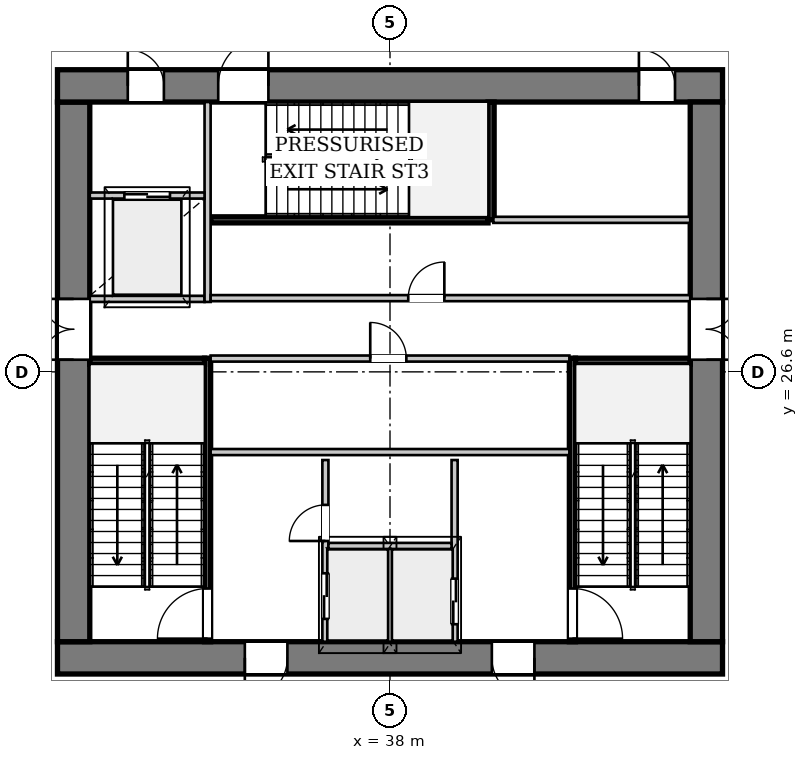
"""IFC4 building model, lengths in metres.
Left out: names, types, materials, properties, quantities, classifications, styles, units other than length and angle.
Written with IfcOpenShell. Run it as: python <this file> out.ifc"""

import sys

from ifc_helpers import new_model, si_unit, direction, frame, frame_2d, origin, place, context, subcontext, project, spatial, rectangle, extrude, source, transform, mapped, element, fill, save


model = new_model("IFC4")
c1 = context("Model", 3, precision=1e-05, world=origin(), true_north=direction((0.0, 1.0)))
c2 = subcontext(c1, "Body", "Model", "MODEL_VIEW")
j1 = project(units=[si_unit("LENGTHUNIT", "METRE"), si_unit("PLANEANGLEUNIT", "RADIAN")], contexts=[c1])
p1 = place(None, origin())
s1 = spatial("IfcSite", under=j1, at=p1, CompositionType="ELEMENT")
p2 = place(p1, origin())
s2 = spatial("IfcBuilding", under=s1, at=p2, CompositionType="ELEMENT")
p3 = place(p2, frame((0.0, 0.0, -4.8)))
s3 = spatial("IfcBuildingStorey", under=s2, at=p3, CompositionType="ELEMENT", Elevation=-4.8)
p4 = place(p3, frame((46.75, 19.075, 0.0), z_axis=(0.0, 0.0, 1.0), x_axis=(-1.0, 0.0, 0.0)))
e1 = element("IfcWall", 1, at=p4, inside=s3, PredefinedType="SHEAR", context=c2, shape_type="SweptSolid", body=[
    extrude(rectangle(XDim=17.5, YDim=0.85, at=frame_2d((8.75, 0.0))), origin(), (0.0, 0.0, 1.0), 4.48),
])
p5 = place(p4, frame((4.95, 0.0, 0.0)))
e2 = element("IfcOpeningElement", 2, at=p5, cuts=e1, PredefinedType="OPENING", context=c2, shape_type="SweptSolid", body=[
    extrude(rectangle(XDim=1.12, YDim=2.25, at=frame_2d((0.56, 1.125))), frame((0.0, 0.435, 0.0), z_axis=(0.0, -1.0, 0.0), x_axis=(1.0, 0.0, 0.0)), (0.0, 0.0, 1.0), 0.87),
])
p6 = place(p4, frame((11.45, 0.0, 0.0)))
e3 = element("IfcOpeningElement", 3, at=p6, cuts=e1, PredefinedType="OPENING", context=c2, shape_type="SweptSolid", body=[
    extrude(rectangle(XDim=1.12, YDim=2.25, at=frame_2d((0.56, 1.125))), frame((0.0, 0.435, 0.0), z_axis=(0.0, -1.0, 0.0), x_axis=(1.0, 0.0, 0.0)), (0.0, 0.0, 1.0), 0.87),
])
p7 = place(p3, frame((29.675, 19.5, 0.0), z_axis=(0.0, 0.0, 1.0), x_axis=(0.0, 1.0, 0.0)))
e4 = element("IfcWall", 4, at=p7, inside=s3, PredefinedType="SHEAR", context=c2, shape_type="SweptSolid", body=[
    extrude(rectangle(XDim=14.2, YDim=0.85, at=frame_2d((7.1, 0.0))), origin(), (0.0, 0.0, 1.0), 4.48),
])
p8 = place(p7, frame((7.42, 0.0, 0.0)))
e5 = element("IfcOpeningElement", 5, at=p8, cuts=e4, PredefinedType="OPENING", context=c2, shape_type="SweptSolid", body=[
    extrude(rectangle(XDim=1.6, YDim=2.2, at=frame_2d((0.8, 1.1))), frame((0.0, 0.435, 0.0), z_axis=(0.0, -1.0, 0.0), x_axis=(1.0, 0.0, 0.0)), (0.0, 0.0, 1.0), 0.87),
])
p9 = place(p3, frame((29.25, 34.125, 0.0), z_axis=(0.0, 0.0, 1.0), x_axis=(1.0, 0.0, 0.0)))
e6 = element("IfcWall", 6, at=p9, inside=s3, PredefinedType="SHEAR", context=c2, shape_type="SweptSolid", body=[
    extrude(rectangle(XDim=17.5, YDim=0.85, at=frame_2d((8.75, 0.0))), origin(), (0.0, 0.0, 1.0), 4.48),
])
p10 = place(p9, frame((1.85, 0.0, 0.0)))
e7 = element("IfcOpeningElement", 7, at=p10, cuts=e6, PredefinedType="OPENING", context=c2, shape_type="SweptSolid", body=[
    extrude(rectangle(XDim=0.95, YDim=2.1, at=frame_2d((0.475, 1.05))), frame((0.0, 0.435, 0.0), z_axis=(0.0, -1.0, 0.0), x_axis=(1.0, 0.0, 0.0)), (0.0, 0.0, 1.0), 0.87),
])
p11 = place(p9, frame((4.23, 0.0, 0.0)))
e8 = element("IfcOpeningElement", 8, at=p11, cuts=e6, PredefinedType="OPENING", context=c2, shape_type="SweptSolid", body=[
    extrude(rectangle(XDim=1.32, YDim=2.2, at=frame_2d((0.66, 1.1))), frame((0.0, 0.435, 0.0), z_axis=(0.0, -1.0, 0.0), x_axis=(1.0, 0.0, 0.0)), (0.0, 0.0, 1.0), 0.87),
])
p12 = place(p9, frame((15.3, 0.0, 0.0)))
e9 = element("IfcOpeningElement", 9, at=p12, cuts=e6, PredefinedType="OPENING", context=c2, shape_type="SweptSolid", body=[
    extrude(rectangle(XDim=0.95, YDim=2.1, at=frame_2d((0.475, 1.05))), frame((0.0, 0.435, 0.0), z_axis=(0.0, -1.0, 0.0), x_axis=(1.0, 0.0, 0.0)), (0.0, 0.0, 1.0), 0.87),
])
p13 = place(p3, frame((46.325, 33.7, 0.0), z_axis=(0.0, 0.0, 1.0), x_axis=(0.0, -1.0, 0.0)))
e10 = element("IfcWall", 10, at=p13, inside=s3, PredefinedType="SHEAR", context=c2, shape_type="SweptSolid", body=[
    extrude(rectangle(XDim=14.2, YDim=0.85, at=frame_2d((7.1, 0.0))), origin(), (0.0, 0.0, 1.0), 4.48),
])
p14 = place(p13, frame((5.18, 0.0, 0.0)))
e11 = element("IfcOpeningElement", 11, at=p14, cuts=e10, PredefinedType="OPENING", context=c2, shape_type="SweptSolid", body=[
    extrude(rectangle(XDim=1.6, YDim=2.2, at=frame_2d((0.8, 1.1))), frame((0.0, 0.435, 0.0), z_axis=(0.0, -1.0, 0.0), x_axis=(1.0, 0.0, 0.0)), (0.0, 0.0, 1.0), 0.87),
])
p15 = place(p3, frame((33.2, 19.5, 0.0), z_axis=(0.0, 0.0, 1.0), x_axis=(0.0, 1.0, 0.0)))
e12 = element("IfcWall", 12, at=p15, inside=s3, PredefinedType="PARTITIONING", context=c2, shape_type="SweptSolid", body=[
    extrude(rectangle(XDim=7.46, YDim=0.16, at=frame_2d((3.73, 0.0))), origin(), (0.0, 0.0, 1.0), 4.48),
])
p16 = place(p15, frame((0.08, 0.0, 0.0)))
e13 = element("IfcOpeningElement", 13, at=p16, cuts=e12, PredefinedType="OPENING", context=c2, shape_type="SweptSolid", body=[
    extrude(rectangle(XDim=1.32, YDim=2.2, at=frame_2d((0.66, 1.1))), frame((0.0, 0.09, 0.0), z_axis=(0.0, -1.0, 0.0), x_axis=(1.0, 0.0, 0.0)), (0.0, 0.0, 1.0), 0.18),
])
p17 = place(p3, frame((30.1, 26.88, 0.0), z_axis=(0.0, 0.0, 1.0), x_axis=(1.0, 0.0, 0.0)))
e14 = element("IfcWall", 14, at=p17, inside=s3, PredefinedType="PARTITIONING", context=c2, shape_type="SweptSolid", body=[
    extrude(rectangle(XDim=3.02, YDim=0.16, at=frame_2d((1.51, 0.0))), origin(), (0.0, 0.0, 1.0), 4.48),
])
p18 = place(p3, frame((42.8, 26.96, 0.0), z_axis=(0.0, 0.0, 1.0), x_axis=(0.0, -1.0, 0.0)))
e15 = element("IfcWall", 15, at=p18, inside=s3, PredefinedType="PARTITIONING", context=c2, shape_type="SweptSolid", body=[
    extrude(rectangle(XDim=7.46, YDim=0.16, at=frame_2d((3.73, 0.0))), origin(), (0.0, 0.0, 1.0), 4.48),
])
p19 = place(p18, frame((6.06, 0.0, 0.0)))
e16 = element("IfcOpeningElement", 16, at=p19, cuts=e15, PredefinedType="OPENING", context=c2, shape_type="SweptSolid", body=[
    extrude(rectangle(XDim=1.32, YDim=2.2, at=frame_2d((0.66, 1.1))), frame((0.0, 0.09, 0.0), z_axis=(0.0, -1.0, 0.0), x_axis=(1.0, 0.0, 0.0)), (0.0, 0.0, 1.0), 0.18),
])
p20 = place(p3, frame((42.88, 26.88, 0.0), z_axis=(0.0, 0.0, 1.0), x_axis=(1.0, 0.0, 0.0)))
e17 = element("IfcWall", 17, at=p20, inside=s3, PredefinedType="PARTITIONING", context=c2, shape_type="SweptSolid", body=[
    extrude(rectangle(XDim=3.02, YDim=0.16, at=frame_2d((1.51, 0.0))), origin(), (0.0, 0.0, 1.0), 4.48),
])
p21 = place(p3, frame((33.28, 30.6, 0.0), z_axis=(0.0, 0.0, 1.0), x_axis=(1.0, 0.0, 0.0)))
e18 = element("IfcWall", 18, at=p21, inside=s3, PredefinedType="PARTITIONING", context=c2, shape_type="SweptSolid", body=[
    extrude(rectangle(XDim=7.3, YDim=0.16, at=frame_2d((3.65, 0.0))), origin(), (0.0, 0.0, 1.0), 4.48),
])
p22 = place(p3, frame((40.66, 30.6, 0.0), z_axis=(0.0, 0.0, 1.0), x_axis=(0.0, 1.0, 0.0)))
e19 = element("IfcWall", 19, at=p22, inside=s3, PredefinedType="PARTITIONING", context=c2, shape_type="SweptSolid", body=[
    extrude(rectangle(XDim=3.1, YDim=0.16, at=frame_2d((1.55, 0.0))), origin(), (0.0, 0.0, 1.0), 4.48),
])
p23 = place(p3, frame((36.3, 19.5, 0.0), z_axis=(0.0, 0.0, 1.0), x_axis=(0.0, 1.0, 0.0)))
e20 = element("IfcWall", 20, at=p23, inside=s3, PredefinedType="PARTITIONING", context=c2, shape_type="SweptSolid", body=[
    extrude(rectangle(XDim=4.78, YDim=0.16, at=frame_2d((2.39, 0.0))), origin(), (0.0, 0.0, 1.0), 4.48),
])
p24 = place(p23, frame((0.6, 0.0, 0.0)))
e21 = element("IfcOpeningElement", 21, at=p24, cuts=e20, PredefinedType="OPENING", context=c2, shape_type="SweptSolid", body=[
    extrude(rectangle(XDim=1.2, YDim=2.2, at=frame_2d((0.6, 1.1))), frame((0.0, 0.09, 0.0), z_axis=(0.0, -1.0, 0.0), x_axis=(1.0, 0.0, 0.0)), (0.0, 0.0, 1.0), 0.18),
])
p25 = place(p23, frame((2.65, 0.0, 0.0)))
e22 = element("IfcOpeningElement", 22, at=p25, cuts=e20, PredefinedType="OPENING", context=c2, shape_type="SweptSolid", body=[
    extrude(rectangle(XDim=0.95, YDim=2.1, at=frame_2d((0.475, 1.05))), frame((0.0, 0.09, 0.0), z_axis=(0.0, -1.0, 0.0), x_axis=(1.0, 0.0, 0.0)), (0.0, 0.0, 1.0), 0.18),
])
p26 = place(p3, frame((39.7, 24.28, 0.0), z_axis=(0.0, 0.0, 1.0), x_axis=(0.0, -1.0, 0.0)))
e23 = element("IfcWall", 23, at=p26, inside=s3, PredefinedType="PARTITIONING", context=c2, shape_type="SweptSolid", body=[
    extrude(rectangle(XDim=4.78, YDim=0.16, at=frame_2d((2.39, 0.0))), origin(), (0.0, 0.0, 1.0), 4.48),
])
p27 = place(p26, frame((3.12, 0.0, 0.0)))
e24 = element("IfcOpeningElement", 24, at=p27, cuts=e23, PredefinedType="OPENING", context=c2, shape_type="SweptSolid", body=[
    extrude(rectangle(XDim=1.2, YDim=2.2, at=frame_2d((0.6, 1.1))), frame((0.0, 0.09, 0.0), z_axis=(0.0, -1.0, 0.0), x_axis=(1.0, 0.0, 0.0)), (0.0, 0.0, 1.0), 0.18),
])
p28 = place(p3, frame((38.0, 19.5, 0.0), z_axis=(0.0, 0.0, 1.0), x_axis=(0.0, 1.0, 0.0)))
e25 = element("IfcWall", 25, at=p28, inside=s3, PredefinedType="PARTITIONING", context=c2, shape_type="SweptSolid", body=[
    extrude(rectangle(XDim=2.46, YDim=0.125, at=frame_2d((1.23, 0.0))), origin(), (0.0, 0.0, 1.0), 4.48),
])
p29 = place(p3, frame((36.38, 22.02, 0.0), z_axis=(0.0, 0.0, 1.0), x_axis=(1.0, 0.0, 0.0)))
e26 = element("IfcWall", 26, at=p29, inside=s3, PredefinedType="PARTITIONING", context=c2, shape_type="SweptSolid", body=[
    extrude(rectangle(XDim=3.24, YDim=0.16, at=frame_2d((1.62, 0.0))), origin(), (0.0, 0.0, 1.0), 4.48),
])
p30 = place(p3, frame((33.28, 24.49, 0.0), z_axis=(0.0, 0.0, 1.0), x_axis=(1.0, 0.0, 0.0)))
e27 = element("IfcWall", 27, at=p30, inside=s3, PredefinedType="PARTITIONING", context=c2, shape_type="SweptSolid", body=[
    extrude(rectangle(XDim=9.44, YDim=0.16, at=frame_2d((4.72, 0.0))), origin(), (0.0, 0.0, 1.0), 4.48),
])
p31 = place(p3, frame((30.1, 28.52, 0.0), z_axis=(0.0, 0.0, 1.0), x_axis=(1.0, 0.0, 0.0)))
e28 = element("IfcWall", 28, at=p31, inside=s3, PredefinedType="PARTITIONING", context=c2, shape_type="SweptSolid", body=[
    extrude(rectangle(XDim=3.02, YDim=0.16, at=frame_2d((1.51, 0.0))), origin(), (0.0, 0.0, 1.0), 4.48),
])
p32 = place(p3, frame((33.2, 28.44, 0.0), z_axis=(0.0, 0.0, 1.0), x_axis=(0.0, 1.0, 0.0)))
e29 = element("IfcWall", 29, at=p32, inside=s3, PredefinedType="PARTITIONING", context=c2, shape_type="SweptSolid", body=[
    extrude(rectangle(XDim=5.26, YDim=0.16, at=frame_2d((2.63, 0.0))), origin(), (0.0, 0.0, 1.0), 4.48),
])
p33 = place(p3, frame((30.1, 31.24, 0.0), z_axis=(0.0, 0.0, 1.0), x_axis=(1.0, 0.0, 0.0)))
e30 = element("IfcWall", 30, at=p33, inside=s3, PredefinedType="PARTITIONING", context=c2, shape_type="SweptSolid", body=[
    extrude(rectangle(XDim=3.02, YDim=0.16, at=frame_2d((1.51, 0.0))), origin(), (0.0, 0.0, 1.0), 4.48),
])
p34 = place(p33, frame((0.91, 0.0, 0.0)))
e31 = element("IfcOpeningElement", 31, at=p34, cuts=e30, PredefinedType="OPENING", context=c2, shape_type="SweptSolid", body=[
    extrude(rectangle(XDim=1.2, YDim=2.2, at=frame_2d((0.6, 1.1))), frame((0.0, 0.09, 0.0), z_axis=(0.0, -1.0, 0.0), x_axis=(1.0, 0.0, 0.0)), (0.0, 0.0, 1.0), 0.18),
])
p35 = place(p3, frame((33.28, 26.95, 0.0), z_axis=(0.0, 0.0, 1.0), x_axis=(1.0, 0.0, 0.0)))
e32 = element("IfcWall", 32, at=p35, inside=s3, PredefinedType="PARTITIONING", context=c2, shape_type="SweptSolid", body=[
    extrude(rectangle(XDim=9.44, YDim=0.16, at=frame_2d((4.72, 0.0))), origin(), (0.0, 0.0, 1.0), 4.48),
])
p36 = place(p35, frame((4.2, 0.0, 0.0)))
e33 = element("IfcOpeningElement", 33, at=p36, cuts=e32, PredefinedType="OPENING", context=c2, shape_type="SweptSolid", body=[
    extrude(rectangle(XDim=0.95, YDim=2.1, at=frame_2d((0.475, 1.05))), frame((0.0, 0.09, 0.0), z_axis=(0.0, -1.0, 0.0), x_axis=(1.0, 0.0, 0.0)), (0.0, 0.0, 1.0), 0.18),
])
p37 = place(p3, frame((33.28, 28.54, 0.0), z_axis=(0.0, 0.0, 1.0), x_axis=(1.0, 0.0, 0.0)))
e34 = element("IfcWall", 34, at=p37, inside=s3, PredefinedType="PARTITIONING", context=c2, shape_type="SweptSolid", body=[
    extrude(rectangle(XDim=12.62, YDim=0.16, at=frame_2d((6.31, 0.0))), origin(), (0.0, 0.0, 1.0), 4.48),
])
p38 = place(p37, frame((5.2, 0.0, 0.0)))
e35 = element("IfcOpeningElement", 35, at=p38, cuts=e34, PredefinedType="OPENING", context=c2, shape_type="SweptSolid", body=[
    extrude(rectangle(XDim=0.95, YDim=2.1, at=frame_2d((0.475, 1.05))), frame((0.0, 0.09, 0.0), z_axis=(0.0, -1.0, 0.0), x_axis=(1.0, 0.0, 0.0)), (0.0, 0.0, 1.0), 0.18),
])
p39 = place(p3, frame((40.72, 30.6, 0.0), z_axis=(0.0, 0.0, 1.0), x_axis=(1.0, 0.0, 0.0)))
e36 = element("IfcWall", 36, at=p39, inside=s3, PredefinedType="PARTITIONING", context=c2, shape_type="SweptSolid", body=[
    extrude(rectangle(XDim=5.18, YDim=0.16, at=frame_2d((2.59, 0.0))), origin(), (0.0, 0.0, 1.0), 4.48),
])
m1 = source(origin(), c2, "Body", "SweptSolid", [
    extrude(rectangle(XDim=1.12, YDim=2.25, at=frame_2d((0.56, 1.125))), frame((0.0, 0.025, 0.0), z_axis=(0.0, -1.0, 0.0), x_axis=(1.0, 0.0, 0.0)), (0.0, 0.0, 1.0), 0.05),
])
p40 = place(p5, origin())
e37 = element("IfcDoor", 37, at=p40, inside=s3, OperationType="SINGLE_SWING_LEFT", PredefinedType="DOOR", context=c2, shape_type="MappedRepresentation", body=[
    mapped(m1, transform((0.0, 0.0, 0.0), x_axis=(1.0, 0.0, 0.0), y_axis=(0.0, 1.0, 0.0), z_axis=(0.0, 0.0, 1.0), scale=1.0)),
])
fill(e2, e37)
p41 = place(p6, origin())
e38 = element("IfcDoor", 38, at=p41, inside=s3, OperationType="SINGLE_SWING_RIGHT", PredefinedType="DOOR", context=c2, shape_type="MappedRepresentation", body=[
    mapped(m1, transform((0.0, 0.0, 0.0), x_axis=(1.0, 0.0, 0.0), y_axis=(0.0, 1.0, 0.0), z_axis=(0.0, 0.0, 1.0), scale=1.0)),
])
fill(e3, e38)
m2 = source(origin(), c2, "Body", "SweptSolid", [
    extrude(rectangle(XDim=1.6, YDim=2.2, at=frame_2d((0.8, 1.1))), frame((0.0, 0.025, 0.0), z_axis=(0.0, -1.0, 0.0), x_axis=(1.0, 0.0, 0.0)), (0.0, 0.0, 1.0), 0.05),
])
p42 = place(p8, origin())
e39 = element("IfcDoor", 39, at=p42, inside=s3, OperationType="DOUBLE_DOOR_SINGLE_SWING", PredefinedType="DOOR", context=c2, shape_type="MappedRepresentation", body=[
    mapped(m2, transform((0.0, 0.0, 0.0), x_axis=(1.0, 0.0, 0.0), y_axis=(0.0, 1.0, 0.0), z_axis=(0.0, 0.0, 1.0), scale=1.0)),
])
fill(e5, e39)
m3 = source(origin(), c2, "Body", "SweptSolid", [
    extrude(rectangle(XDim=0.95, YDim=2.1, at=frame_2d((0.475, 1.05))), frame((0.0, 0.025, 0.0), z_axis=(0.0, -1.0, 0.0), x_axis=(1.0, 0.0, 0.0)), (0.0, 0.0, 1.0), 0.05),
])
p43 = place(p10, origin())
e40 = element("IfcDoor", 40, at=p43, inside=s3, OperationType="SINGLE_SWING_LEFT", PredefinedType="DOOR", context=c2, shape_type="MappedRepresentation", body=[
    mapped(m3, transform((0.0, 0.0, 0.0), x_axis=(1.0, 0.0, 0.0), y_axis=(0.0, 1.0, 0.0), z_axis=(0.0, 0.0, 1.0), scale=1.0)),
])
fill(e7, e40)
m4 = source(origin(), c2, "Body", "SweptSolid", [
    extrude(rectangle(XDim=1.32, YDim=2.2, at=frame_2d((0.66, 1.1))), frame((0.0, 0.025, 0.0), z_axis=(0.0, -1.0, 0.0), x_axis=(1.0, 0.0, 0.0)), (0.0, 0.0, 1.0), 0.05),
])
p44 = place(p11, origin())
e41 = element("IfcDoor", 41, at=p44, inside=s3, OperationType="SINGLE_SWING_RIGHT", PredefinedType="DOOR", context=c2, shape_type="MappedRepresentation", body=[
    mapped(m4, transform((0.0, 0.0, 0.0), x_axis=(1.0, 0.0, 0.0), y_axis=(0.0, 1.0, 0.0), z_axis=(0.0, 0.0, 1.0), scale=1.0)),
])
fill(e8, e41)
p45 = place(p14, origin())
e42 = element("IfcDoor", 42, at=p45, inside=s3, OperationType="DOUBLE_DOOR_SINGLE_SWING", PredefinedType="DOOR", context=c2, shape_type="MappedRepresentation", body=[
    mapped(m2, transform((0.0, 0.0, 0.0), x_axis=(1.0, 0.0, 0.0), y_axis=(0.0, 1.0, 0.0), z_axis=(0.0, 0.0, 1.0), scale=1.0)),
])
fill(e11, e42)
p46 = place(p16, origin())
e43 = element("IfcDoor", 43, at=p46, inside=s3, OperationType="SINGLE_SWING_LEFT", PredefinedType="DOOR", context=c2, shape_type="MappedRepresentation", body=[
    mapped(m4, transform((0.0, 0.0, 0.0), x_axis=(1.0, 0.0, 0.0), y_axis=(0.0, 1.0, 0.0), z_axis=(0.0, 0.0, 1.0), scale=1.0)),
])
fill(e13, e43)
p47 = place(p19, origin())
e44 = element("IfcDoor", 44, at=p47, inside=s3, OperationType="SINGLE_SWING_RIGHT", PredefinedType="DOOR", context=c2, shape_type="MappedRepresentation", body=[
    mapped(m4, transform((0.0, 0.0, 0.0), x_axis=(1.0, 0.0, 0.0), y_axis=(0.0, 1.0, 0.0), z_axis=(0.0, 0.0, 1.0), scale=1.0)),
])
fill(e16, e44)
m5 = source(origin(), c2, "Body", "SweptSolid", [
    extrude(rectangle(XDim=1.2, YDim=2.2, at=frame_2d((0.6, 1.1))), frame((0.0, 0.025, 0.0), z_axis=(0.0, -1.0, 0.0), x_axis=(1.0, 0.0, 0.0)), (0.0, 0.0, 1.0), 0.05),
])
p48 = place(p24, origin())
e45 = element("IfcDoor", 45, at=p48, inside=s3, OperationType="DOUBLE_DOOR_SLIDING", PredefinedType="DOOR", context=c2, shape_type="MappedRepresentation", body=[
    mapped(m5, transform((0.0, 0.0, 0.0), x_axis=(1.0, 0.0, 0.0), y_axis=(0.0, 1.0, 0.0), z_axis=(0.0, 0.0, 1.0), scale=1.0)),
])
fill(e21, e45)
p49 = place(p25, origin())
e46 = element("IfcDoor", 46, at=p49, inside=s3, OperationType="SINGLE_SWING_LEFT", PredefinedType="DOOR", context=c2, shape_type="MappedRepresentation", body=[
    mapped(m3, transform((0.0, 0.0, 0.0), x_axis=(1.0, 0.0, 0.0), y_axis=(0.0, 1.0, 0.0), z_axis=(0.0, 0.0, 1.0), scale=1.0)),
])
fill(e22, e46)
p50 = place(p27, origin())
e47 = element("IfcDoor", 47, at=p50, inside=s3, OperationType="DOUBLE_DOOR_SLIDING", PredefinedType="DOOR", context=c2, shape_type="MappedRepresentation", body=[
    mapped(m5, transform((0.0, 0.0, 0.0), x_axis=(1.0, 0.0, 0.0), y_axis=(0.0, 1.0, 0.0), z_axis=(0.0, 0.0, 1.0), scale=1.0)),
])
fill(e24, e47)
p51 = place(p34, origin())
e48 = element("IfcDoor", 48, at=p51, inside=s3, OperationType="DOUBLE_DOOR_SLIDING", PredefinedType="DOOR", context=c2, shape_type="MappedRepresentation", body=[
    mapped(m5, transform((0.0, 0.0, 0.0), x_axis=(1.0, 0.0, 0.0), y_axis=(0.0, 1.0, 0.0), z_axis=(0.0, 0.0, 1.0), scale=1.0)),
])
fill(e31, e48)
p52 = place(p36, origin())
e49 = element("IfcDoor", 49, at=p52, inside=s3, OperationType="SINGLE_SWING_LEFT", PredefinedType="DOOR", context=c2, shape_type="MappedRepresentation", body=[
    mapped(m3, transform((0.0, 0.0, 0.0), x_axis=(1.0, 0.0, 0.0), y_axis=(0.0, 1.0, 0.0), z_axis=(0.0, 0.0, 1.0), scale=1.0)),
])
fill(e33, e49)
p53 = place(p38, origin())
e50 = element("IfcDoor", 50, at=p53, inside=s3, OperationType="SINGLE_SWING_RIGHT", PredefinedType="DOOR", context=c2, shape_type="MappedRepresentation", body=[
    mapped(m3, transform((0.0, 0.0, 0.0), x_axis=(1.0, 0.0, 0.0), y_axis=(0.0, 1.0, 0.0), z_axis=(0.0, 0.0, 1.0), scale=1.0)),
])
fill(e35, e50)
p54 = place(p12, origin())
e51 = element("IfcDoor", 51, at=p54, inside=s3, OperationType="SINGLE_SWING_LEFT", PredefinedType="DOOR", context=c2, shape_type="MappedRepresentation", body=[
    mapped(m3, transform((0.0, 0.0, 0.0), x_axis=(1.0, 0.0, 0.0), y_axis=(0.0, 1.0, 0.0), z_axis=(0.0, 0.0, 1.0), scale=1.0)),
])
fill(e9, e51)
save(model, sys.argv[1])
